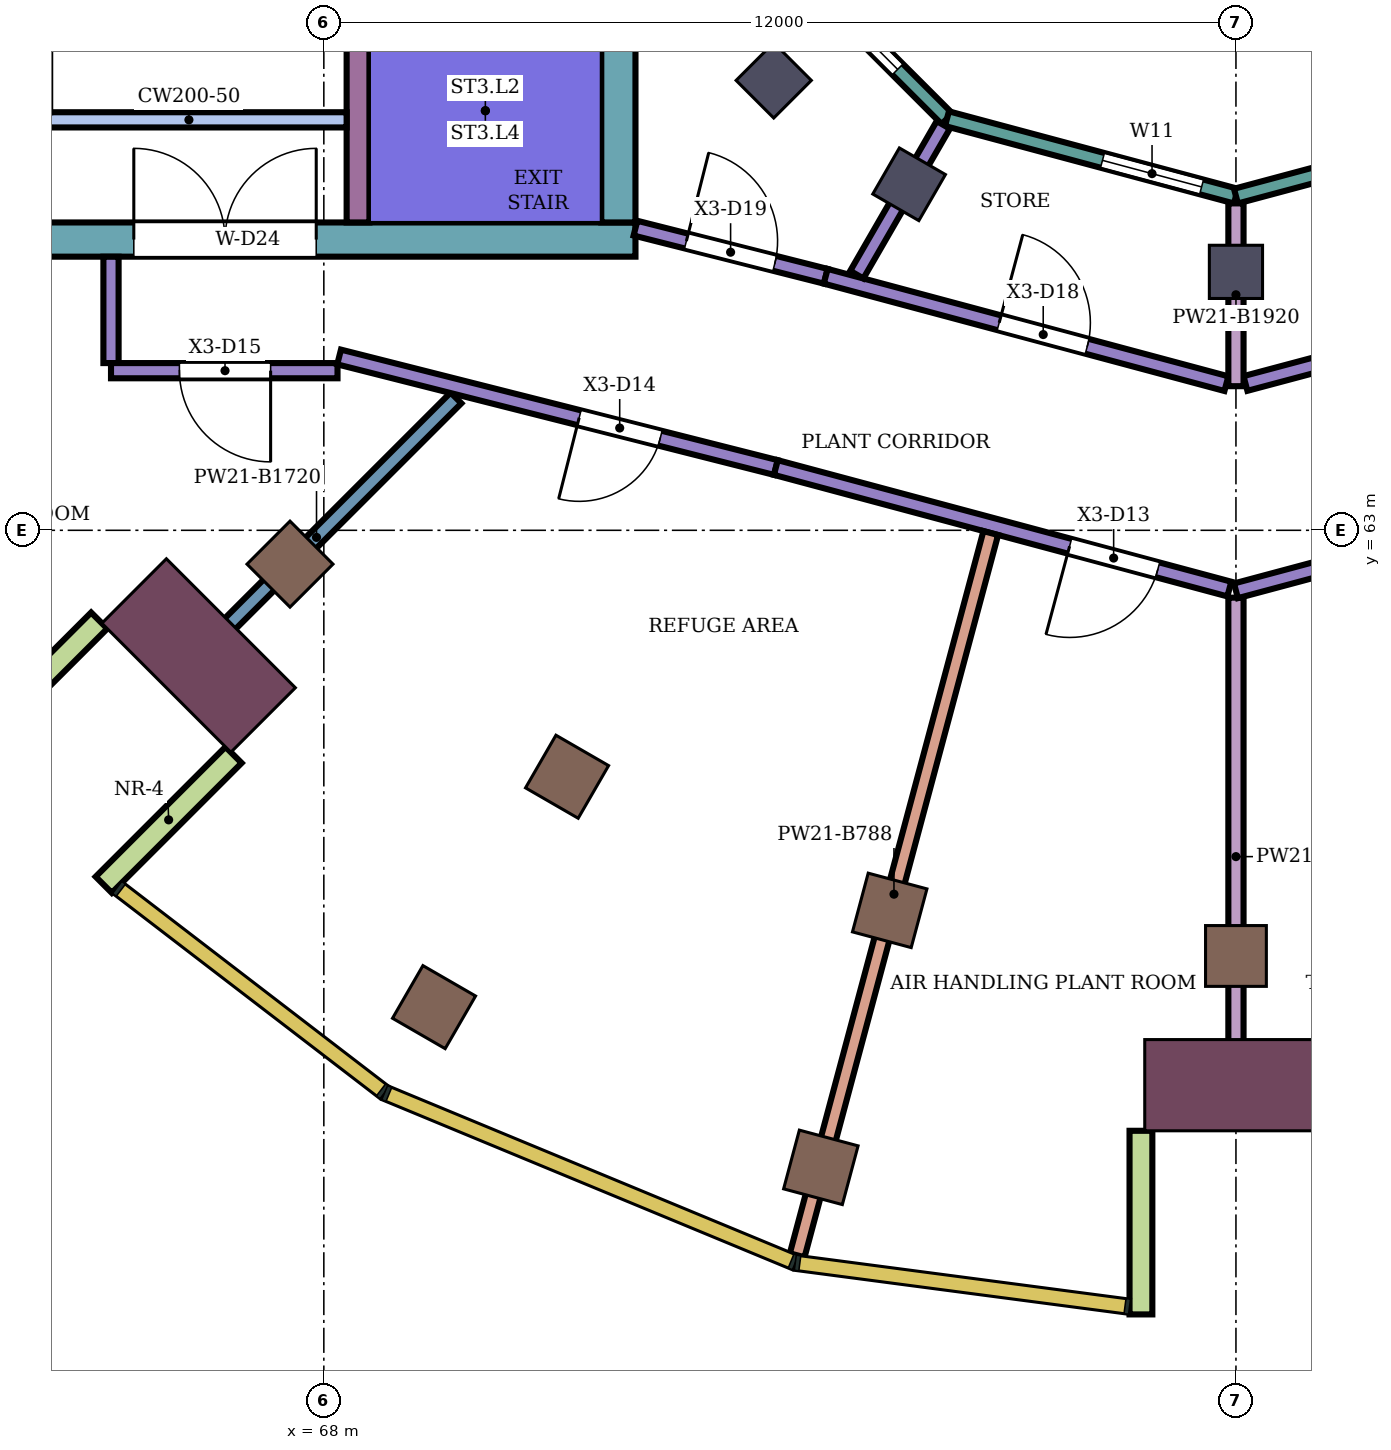
"""IFC4 building model, lengths in metres.
Left out: names, types, materials, properties, quantities, classifications, styles, units other than length and angle.
Written with IfcOpenShell. Run it as: python <this file> out.ifc"""

import sys

from ifc_helpers import new_model, si_unit, direction, frame, frame_2d, origin, origin_2d, place, context, subcontext, project, spatial, rectangle, extrude, element, fill, save


model = new_model("IFC4")
c1 = context("Model", 3, precision=1e-05, world=origin(), true_north=direction((0.0, 1.0)))
c2 = subcontext(c1, "Body", "Model", "MODEL_VIEW")
j1 = project(units=[si_unit("LENGTHUNIT", "METRE"), si_unit("PLANEANGLEUNIT", "RADIAN")], contexts=[c1])
p1 = place(None, origin())
s1 = spatial("IfcSite", under=j1, at=p1, CompositionType="ELEMENT")
p2 = place(p1, origin())
s2 = spatial("IfcBuilding", under=s1, at=p2, CompositionType="ELEMENT")
p3 = place(p2, frame((0.0, 0.0, 309.3)))
s3 = spatial("IfcBuildingStorey", under=s2, at=p3, CompositionType="ELEMENT", Elevation=309.3)
for number, where, z_axis, x_axis in (
    (1, (69.45, 56.727, 0.0), (0.0, 0.0, 1.0), (-0.5, -0.866, 0.0)),
    (2, (74.539, 54.619, 0.0), (0.0, 0.0, 1.0), (-0.259, -0.966, 0.0)),
    (3, (67.555, 62.555, 0.0), (0.0, 0.0, 1.0), (-0.707, -0.707, 0.0)),
    (4, (71.2, 59.758, 0.0), (0.0, 0.0, 1.0), (-0.5, -0.866, 0.0)),
    (5, (75.445, 58.0, 0.0), (0.0, 0.0, 1.0), (-0.259, -0.966, 0.0)),
    (6, (80.0, 57.4, 0.0), (0.0, 0.0, 1.0), (0.0, -1.0, 0.0)),
):
    element("IfcColumn", number, at=place(p3, frame(where, z_axis=z_axis, x_axis=x_axis)), inside=s3, PredefinedType="COLUMN", context=c2, shape_type="SweptSolid", body=[
        extrude(rectangle(XDim=0.8, YDim=0.8, at=origin_2d()), origin(), (0.0, 0.0, 1.0), 5.6),
    ])
for number, where, z_axis, x_axis in (
    (7, (73.919, 68.919, 0.0), (0.0, 0.0, 1.0), (-0.707, -0.707, 0.0)),
    (8, (75.7, 67.552, 0.0), (0.0, 0.0, 1.0), (-0.5, -0.866, 0.0)),
    (9, (80.0, 66.4, 0.0), (0.0, 0.0, 1.0), (0.0, -1.0, 0.0)),
):
    element("IfcColumn", number, at=place(p3, frame(where, z_axis=z_axis, x_axis=x_axis)), inside=s3, PredefinedType="COLUMN", context=c2, shape_type="SweptSolid", body=[
        extrude(rectangle(XDim=0.7, YDim=0.7, at=origin_2d()), origin(), (0.0, 0.0, 1.0), 5.6),
    ])
for number, where, z_axis, x_axis in (
    (10, (66.353, 61.353, 0.0), (0.0, 0.0, 1.0), (-0.707, -0.707, 0.0)),
    (11, (80.0, 55.7, 0.0), (0.0, 0.0, 1.0), (0.0, -1.0, 0.0)),
):
    element("IfcColumn", number, at=place(p3, frame(where, z_axis=z_axis, x_axis=x_axis)), inside=s3, PredefinedType="COLUMN", context=c2, shape_type="SweptSolid", body=[
        extrude(rectangle(XDim=1.2, YDim=2.4, at=origin_2d()), origin(), (0.0, 0.0, 1.0), 5.6),
    ])
p4 = place(p3, frame((72.1, 66.825, 0.0), z_axis=(0.0, 0.0, 1.0), x_axis=(-1.0, 0.0, 0.0)))
e12 = element("IfcWall", 12, at=p4, inside=s3, PredefinedType="SHEAR", context=c2, shape_type="SweptSolid", body=[
    extrude(rectangle(XDim=12.0, YDim=0.45, at=frame_2d((6.0, 0.0))), origin(), (0.0, 0.0, 1.0), 5.28),
])
p5 = place(p4, frame((4.2, 0.0, 0.0)))
e13 = element("IfcOpeningElement", 13, at=p5, cuts=e12, PredefinedType="OPENING", context=c2, shape_type="SweptSolid", body=[
    extrude(rectangle(XDim=2.4, YDim=2.4, at=frame_2d((1.2, 1.2))), frame((0.0, 0.235, 0.0), z_axis=(0.0, -1.0, 0.0), x_axis=(1.0, 0.0, 0.0)), (0.0, 0.0, 1.0), 0.47),
])
p6 = place(p3, frame((71.875, 75.0, 0.0), z_axis=(0.0, 0.0, 1.0), x_axis=(0.0, -1.0, 0.0)))
e14 = element("IfcWall", 14, at=p6, inside=s3, PredefinedType="SHEAR", context=c2, shape_type="SweptSolid", body=[
    extrude(rectangle(XDim=7.95, YDim=0.45, at=frame_2d((3.975, 0.0))), origin(), (0.0, 0.0, 1.0), 5.28),
])
p7 = place(p3, frame((68.45, 75.0, 0.0), z_axis=(0.0, 0.0, 1.0), x_axis=(0.0, -1.0, 0.0)))
e15 = element("IfcWall", 15, at=p7, inside=s3, PredefinedType="SHEAR", context=c2, shape_type="SweptSolid", body=[
    extrude(rectangle(XDim=7.95, YDim=0.3, at=frame_2d((3.975, 0.0))), origin(), (0.0, 0.0, 1.0), 5.28),
])
p8 = place(p7, frame((1.85, 0.0, 0.0)))
e16 = element("IfcOpeningElement", 16, at=p8, cuts=e15, PredefinedType="OPENING", context=c2, shape_type="SweptSolid", body=[
    extrude(rectangle(XDim=0.9, YDim=2.1, at=frame_2d((0.45, 1.05))), frame((0.0, 0.16, 0.0), z_axis=(0.0, -1.0, 0.0), x_axis=(1.0, 0.0, 0.0)), (0.0, 0.0, 1.0), 0.32),
])
p9 = place(p3, frame((68.3, 68.4, 0.0), z_axis=(0.0, 0.0, 1.0), x_axis=(-1.0, 0.0, 0.0)))
e17 = element("IfcWall", 17, at=p9, inside=s3, PredefinedType="SHEAR", context=c2, shape_type="SweptSolid", body=[
    extrude(rectangle(XDim=4.15, YDim=0.2, at=frame_2d((2.075, 0.0))), origin(), (0.0, 0.0, 1.0), 5.28),
])
for number, where, z_axis, x_axis in (
    (18, (65.045, 61.812, 0.0), (0.0, 0.0, 1.0), (-0.707, -0.707, 0.0)),
    (19, (66.812, 60.045, 0.0), (0.0, 0.0, 1.0), (-0.707, -0.707, 0.0)),
    (20, (78.75, 55.1, 0.0), (0.0, 0.0, 1.0), (0.0, -1.0, 0.0)),
):
    element("IfcWall", number, at=place(p3, frame(where, z_axis=z_axis, x_axis=x_axis)), inside=s3, PredefinedType="NOTDEFINED", context=c2, shape_type="SweptSolid", body=[
        extrude(rectangle(XDim=2.416, YDim=0.3, at=frame_2d((1.208, 0.0))), origin(), (0.0, 0.0, 1.0), 5.6),
    ])
p10 = place(p3, frame((73.415, 71.198, 0.0), z_axis=(0.0, 0.0, 1.0), x_axis=(0.707106781187, -0.707106781187, 0.0)))
e21 = element("IfcWall", 21, at=p10, inside=s3, PredefinedType="NOTDEFINED", context=c2, shape_type="SweptSolid", body=[
    extrude(rectangle(XDim=3.936, YDim=0.2, at=frame_2d((1.968, 0.0))), origin(), (0.0, 0.0, 1.0), 5.6),
])
p11 = place(p10, frame((0.468, 0.0, 0.9)))
e22 = element("IfcOpeningElement", 22, at=p11, cuts=e21, PredefinedType="OPENING", context=c2, shape_type="SweptSolid", body=[
    extrude(rectangle(XDim=2.55, YDim=2.3, at=frame_2d((1.275, 1.15))), frame((0.0, 0.11, 0.0), z_axis=(0.0, -1.0, 0.0), x_axis=(1.0, 0.0, 0.0)), (0.0, 0.0, 1.0), 0.22),
])
p12 = place(p3, frame((76.198, 68.415, 0.0), z_axis=(0.0, 0.0, 1.0), x_axis=(0.965933654434, -0.258789828301, 0.0)))
e23 = element("IfcWall", 23, at=p12, inside=s3, PredefinedType="NOTDEFINED", context=c2, shape_type="SweptSolid", body=[
    extrude(rectangle(XDim=3.936, YDim=0.2, at=frame_2d((1.968, 0.0))), origin(), (0.0, 0.0, 1.0), 5.6),
])
p13 = place(p12, frame((2.118, 0.0, 0.9)))
e24 = element("IfcOpeningElement", 24, at=p13, cuts=e23, PredefinedType="OPENING", context=c2, shape_type="SweptSolid", body=[
    extrude(rectangle(XDim=1.35, YDim=2.3, at=frame_2d((0.675, 1.15))), frame((0.0, 0.11, 0.0), z_axis=(0.0, -1.0, 0.0), x_axis=(1.0, 0.0, 0.0)), (0.0, 0.0, 1.0), 0.22),
])
p14 = place(p3, frame((80.0, 67.396, 0.0), z_axis=(0.0, 0.0, 1.0), x_axis=(0.965933654434, 0.258789828301, 0.0)))
e25 = element("IfcWall", 25, at=p14, inside=s3, PredefinedType="NOTDEFINED", context=c2, shape_type="SweptSolid", body=[
    extrude(rectangle(XDim=3.936, YDim=0.2, at=frame_2d((1.968, 0.0))), origin(), (0.0, 0.0, 1.0), 5.6),
])
p15 = place(p14, frame((2.118, 0.0, 0.9)))
e26 = element("IfcOpeningElement", 26, at=p15, cuts=e25, PredefinedType="OPENING", context=c2, shape_type="SweptSolid", body=[
    extrude(rectangle(XDim=1.35, YDim=2.3, at=frame_2d((0.675, 1.15))), frame((0.0, 0.11, 0.0), z_axis=(0.0, -1.0, 0.0), x_axis=(1.0, 0.0, 0.0)), (0.0, 0.0, 1.0), 0.22),
])
p16 = place(p3, frame((65.2, 65.2, 0.0), z_axis=(0.0, 0.0, 1.0), x_axis=(0.0, 1.0, 0.0)))
e27 = element("IfcWall", 27, at=p16, inside=s3, PredefinedType="PARTITIONING", context=c2, shape_type="SweptSolid", body=[
    extrude(rectangle(XDim=1.399, YDim=0.2, at=frame_2d((0.7, 0.0))), origin(), (0.0, 0.0, 1.0), 5.15),
])
p17 = place(p3, frame((65.2, 65.1, 0.0), z_axis=(0.0, 0.0, 1.0), x_axis=(1.0, 0.0, 0.0)))
e28 = element("IfcWall", 28, at=p17, inside=s3, PredefinedType="PARTITIONING", context=c2, shape_type="SweptSolid", body=[
    extrude(rectangle(XDim=2.98, YDim=0.2, at=frame_2d((1.49, 0.0))), origin(), (0.0, 0.0, 1.0), 5.15),
])
p18 = place(p17, frame((0.9, 0.0, 0.0)))
e29 = element("IfcOpeningElement", 29, at=p18, cuts=e28, PredefinedType="OPENING", context=c2, shape_type="SweptSolid", body=[
    extrude(rectangle(XDim=1.2, YDim=2.4, at=frame_2d((0.6, 1.2))), frame((0.0, 0.11, 0.0), z_axis=(0.0, -1.0, 0.0), x_axis=(1.0, 0.0, 0.0)), (0.0, 0.0, 1.0), 0.22),
])
p19 = place(p3, frame((66.069, 61.073, 0.0), z_axis=(0.0, 0.0, 1.0), x_axis=(0.707200867644, 0.707012682208, 0.0)))
e30 = element("IfcWall", 30, at=p19, inside=s3, PredefinedType="PARTITIONING", context=c2, shape_type="SweptSolid", body=[
    extrude(rectangle(XDim=5.189, YDim=0.2, at=frame_2d((2.595, 0.0))), origin(), (0.0, 0.0, 1.0), 3.88),
])
p20 = place(p3, frame((68.201, 65.28, 0.0), z_axis=(0.0, 0.0, 1.0), x_axis=(0.969440682923, -0.245325828836, 0.0)))
e31 = element("IfcWall", 31, at=p20, inside=s3, PredefinedType="PARTITIONING", context=c2, shape_type="SweptSolid", body=[
    extrude(rectangle(XDim=5.927, YDim=0.2, at=frame_2d((2.964, 0.0))), origin(), (0.0, 0.0, 1.0), 5.15),
])
p21 = place(p20, frame((3.258, 0.0, 0.0)))
e32 = element("IfcOpeningElement", 32, at=p21, cuts=e31, PredefinedType="OPENING", context=c2, shape_type="SweptSolid", body=[
    extrude(rectangle(XDim=1.1, YDim=2.1, at=frame_2d((0.55, 1.05))), frame((0.0, 0.11, 0.0), z_axis=(0.0, -1.0, 0.0), x_axis=(1.0, 0.0, 0.0)), (0.0, 0.0, 1.0), 0.22),
])
p22 = place(p3, frame((72.1, 66.975, 0.0), z_axis=(0.0, 0.0, 1.0), x_axis=(0.969471314457, -0.245204752086, 0.0)))
e33 = element("IfcWall", 33, at=p22, inside=s3, PredefinedType="PARTITIONING", context=c2, shape_type="SweptSolid", body=[
    extrude(rectangle(XDim=2.582, YDim=0.2, at=frame_2d((1.291, 0.0))), origin(), (0.0, 0.0, 1.0), 5.15),
])
p23 = place(p22, frame((0.691, 0.0, 0.0)))
e34 = element("IfcOpeningElement", 34, at=p23, cuts=e33, PredefinedType="OPENING", context=c2, shape_type="SweptSolid", body=[
    extrude(rectangle(XDim=1.2, YDim=2.4, at=frame_2d((0.6, 1.2))), frame((0.0, 0.11, 0.0), z_axis=(0.0, -1.0, 0.0), x_axis=(1.0, 0.0, 0.0)), (0.0, 0.0, 1.0), 0.22),
])
p24 = place(p3, frame((73.947, 63.826, 0.0), z_axis=(0.0, 0.0, 1.0), x_axis=(0.965924585279, -0.258823676573, 0.0)))
e35 = element("IfcWall", 35, at=p24, inside=s3, PredefinedType="PARTITIONING", context=c2, shape_type="SweptSolid", body=[
    extrude(rectangle(XDim=6.177, YDim=0.2, at=frame_2d((3.088, 0.0))), origin(), (0.0, 0.0, 1.0), 5.15),
])
p25 = place(p24, frame((4.001, 0.0, 0.0)))
e36 = element("IfcOpeningElement", 36, at=p25, cuts=e35, PredefinedType="OPENING", context=c2, shape_type="SweptSolid", body=[
    extrude(rectangle(XDim=1.2, YDim=2.4, at=frame_2d((0.6, 1.2))), frame((0.0, 0.11, 0.0), z_axis=(0.0, -1.0, 0.0), x_axis=(1.0, 0.0, 0.0)), (0.0, 0.0, 1.0), 0.22),
])
p26 = place(p3, frame((74.228, 53.462, 0.0), z_axis=(0.0, 0.0, 1.0), x_axis=(0.258887433163, 0.965907499169, 0.0)))
e37 = element("IfcWall", 37, at=p26, inside=s3, PredefinedType="PARTITIONING", context=c2, shape_type="SweptSolid", body=[
    extrude(rectangle(XDim=9.837, YDim=0.2, at=frame_2d((4.918, 0.0))), origin(), (0.0, 0.0, 1.0), 4.812),
])
p27 = place(p3, frame((74.603, 66.342, 0.0), z_axis=(0.0, 0.0, 1.0), x_axis=(0.965920893652, -0.258837453254, 0.0)))
e38 = element("IfcWall", 38, at=p27, inside=s3, PredefinedType="PARTITIONING", context=c2, shape_type="SweptSolid", body=[
    extrude(rectangle(XDim=5.458, YDim=0.2, at=frame_2d((2.729, 0.0))), origin(), (0.0, 0.0, 1.0), 5.15),
])
p28 = place(p27, frame((2.362, 0.0, 0.0)))
e39 = element("IfcOpeningElement", 39, at=p28, cuts=e38, PredefinedType="OPENING", context=c2, shape_type="SweptSolid", body=[
    extrude(rectangle(XDim=1.2, YDim=2.4, at=frame_2d((0.6, 1.2))), frame((0.0, 0.11, 0.0), z_axis=(0.0, -1.0, 0.0), x_axis=(1.0, 0.0, 0.0)), (0.0, 0.0, 1.0), 0.22),
])
p29 = place(p3, frame((75.012, 66.363, 0.0), z_axis=(0.0, 0.0, 1.0), x_axis=(0.500143511652, 0.865942531438, 0.0)))
e40 = element("IfcWall", 40, at=p29, inside=s3, PredefinedType="PARTITIONING", context=c2, shape_type="SweptSolid", body=[
    extrude(rectangle(XDim=2.275, YDim=0.2, at=frame_2d((1.138, 0.0))), origin(), (0.0, 0.0, 1.0), 5.15),
])
p30 = place(p3, frame((80.125, 64.932, 0.0), z_axis=(0.0, 0.0, 1.0), x_axis=(0.966236955806, 0.257655089674, 0.0)))
e41 = element("IfcWall", 41, at=p30, inside=s3, PredefinedType="PARTITIONING", context=c2, shape_type="SweptSolid", body=[
    extrude(rectangle(XDim=8.039, YDim=0.2, at=frame_2d((4.02, 0.0))), origin(), (0.0, 0.0, 1.0), 5.15),
])
p31 = place(p30, frame((6.148, 0.0, 0.0)))
e42 = element("IfcOpeningElement", 42, at=p31, cuts=e41, PredefinedType="OPENING", context=c2, shape_type="SweptSolid", body=[
    extrude(rectangle(XDim=1.2, YDim=2.4, at=frame_2d((0.6, 1.2))), frame((0.0, 0.11, 0.0), z_axis=(0.0, -1.0, 0.0), x_axis=(1.0, 0.0, 0.0)), (0.0, 0.0, 1.0), 0.22),
])
p32 = place(p30, frame((1.895, 0.0, 0.0)))
e43 = element("IfcOpeningElement", 43, at=p32, cuts=e41, PredefinedType="OPENING", context=c2, shape_type="SweptSolid", body=[
    extrude(rectangle(XDim=1.2, YDim=2.4, at=frame_2d((0.6, 1.2))), frame((0.0, 0.11, 0.0), z_axis=(0.0, -1.0, 0.0), x_axis=(1.0, 0.0, 0.0)), (0.0, 0.0, 1.0), 0.22),
])
p33 = place(p3, frame((80.0, 55.3, 0.0), z_axis=(0.0, 0.0, 1.0), x_axis=(0.0, 1.0, 0.0)))
e44 = element("IfcWall", 44, at=p33, inside=s3, PredefinedType="PARTITIONING", context=c2, shape_type="SweptSolid", body=[
    extrude(rectangle(XDim=6.814, YDim=0.2, at=frame_2d((3.407, 0.0))), origin(), (0.0, 0.0, 1.0), 3.68),
])
p34 = place(p3, frame((80.0, 62.204, 0.0), z_axis=(0.0, 0.0, 1.0), x_axis=(0.965938139786, 0.258773086132, 0.0)))
e45 = element("IfcWall", 45, at=p34, inside=s3, PredefinedType="PARTITIONING", context=c2, shape_type="SweptSolid", body=[
    extrude(rectangle(XDim=6.266, YDim=0.2, at=frame_2d((3.133, 0.0))), origin(), (0.0, 0.0, 1.0), 5.15),
])
p35 = place(p34, frame((1.066, 0.0, 0.0)))
e46 = element("IfcOpeningElement", 46, at=p35, cuts=e45, PredefinedType="OPENING", context=c2, shape_type="SweptSolid", body=[
    extrude(rectangle(XDim=1.2, YDim=2.4, at=frame_2d((0.6, 1.2))), frame((0.0, 0.11, 0.0), z_axis=(0.0, -1.0, 0.0), x_axis=(1.0, 0.0, 0.0)), (0.0, 0.0, 1.0), 0.22),
])
p36 = place(p3, frame((80.0, 64.896, 0.0), z_axis=(0.0, 0.0, 1.0), x_axis=(0.0, 1.0, 0.0)))
e47 = element("IfcWall", 47, at=p36, inside=s3, PredefinedType="PARTITIONING", context=c2, shape_type="SweptSolid", body=[
    extrude(rectangle(XDim=2.405, YDim=0.2, at=frame_2d((1.203, 0.0))), origin(), (0.0, 0.0, 1.0), 3.68),
])
p37 = place(p11, origin())
e48 = element("IfcWindow", 48, at=p37, inside=s3, PartitioningType="SINGLE_PANEL", PredefinedType="WINDOW", context=c2, shape_type="SweptSolid", body=[
    extrude(rectangle(XDim=2.55, YDim=2.3, at=frame_2d((1.275, 1.15))), frame((0.0, 0.03, 0.0), z_axis=(0.0, -1.0, 0.0), x_axis=(1.0, 0.0, 0.0)), (0.0, 0.0, 1.0), 0.06),
])
fill(e22, e48)
p38 = place(p13, origin())
e49 = element("IfcWindow", 49, at=p38, inside=s3, PartitioningType="SINGLE_PANEL", PredefinedType="WINDOW", context=c2, shape_type="SweptSolid", body=[
    extrude(rectangle(XDim=1.35, YDim=2.3, at=frame_2d((0.675, 1.15))), frame((0.0, 0.03, 0.0), z_axis=(0.0, -1.0, 0.0), x_axis=(1.0, 0.0, 0.0)), (0.0, 0.0, 1.0), 0.06),
])
fill(e24, e49)
p39 = place(p25, frame((1.2, 0.0, 0.0), z_axis=(0.0, 0.0, 1.0), x_axis=(-1.0, 0.0, 0.0)))
e50 = element("IfcDoor", 50, at=p39, inside=s3, OperationType="SINGLE_SWING_RIGHT", PredefinedType="DOOR", context=c2, shape_type="SweptSolid", body=[
    extrude(rectangle(XDim=1.2, YDim=2.4, at=frame_2d((0.6, 1.2))), frame((0.0, 0.025, 0.0), z_axis=(0.0, -1.0, 0.0), x_axis=(1.0, 0.0, 0.0)), (0.0, 0.0, 1.0), 0.05),
])
fill(e36, e50)
p40 = place(p21, frame((1.1, 0.0, 0.0), z_axis=(0.0, 0.0, 1.0), x_axis=(-1.0, 0.0, 0.0)))
e51 = element("IfcDoor", 51, at=p40, inside=s3, OperationType="SINGLE_SWING_RIGHT", PredefinedType="DOOR", context=c2, shape_type="SweptSolid", body=[
    extrude(rectangle(XDim=1.1, YDim=2.1, at=frame_2d((0.55, 1.05))), frame((0.0, 0.025, 0.0), z_axis=(0.0, -1.0, 0.0), x_axis=(1.0, 0.0, 0.0)), (0.0, 0.0, 1.0), 0.05),
])
fill(e32, e51)
p41 = place(p18, frame((1.2, 0.0, 0.0), z_axis=(0.0, 0.0, 1.0), x_axis=(-1.0, 0.0, 0.0)))
e52 = element("IfcDoor", 52, at=p41, inside=s3, OperationType="SINGLE_SWING_LEFT", PredefinedType="DOOR", context=c2, shape_type="SweptSolid", body=[
    extrude(rectangle(XDim=1.2, YDim=2.4, at=frame_2d((0.6, 1.2))), frame((0.0, 0.025, 0.0), z_axis=(0.0, -1.0, 0.0), x_axis=(1.0, 0.0, 0.0)), (0.0, 0.0, 1.0), 0.05),
])
fill(e29, e52)
p42 = place(p28, origin())
e53 = element("IfcDoor", 53, at=p42, inside=s3, OperationType="SINGLE_SWING_LEFT", PredefinedType="DOOR", context=c2, shape_type="SweptSolid", body=[
    extrude(rectangle(XDim=1.2, YDim=2.4, at=frame_2d((0.6, 1.2))), frame((0.0, 0.025, 0.0), z_axis=(0.0, -1.0, 0.0), x_axis=(1.0, 0.0, 0.0)), (0.0, 0.0, 1.0), 0.05),
])
fill(e39, e53)
p43 = place(p23, origin())
e54 = element("IfcDoor", 54, at=p43, inside=s3, OperationType="SINGLE_SWING_LEFT", PredefinedType="DOOR", context=c2, shape_type="SweptSolid", body=[
    extrude(rectangle(XDim=1.2, YDim=2.4, at=frame_2d((0.6, 1.2))), frame((0.0, 0.025, 0.0), z_axis=(0.0, -1.0, 0.0), x_axis=(1.0, 0.0, 0.0)), (0.0, 0.0, 1.0), 0.05),
])
fill(e34, e54)
p44 = place(p5, frame((2.4, 0.0, 0.0), z_axis=(0.0, 0.0, 1.0), x_axis=(-1.0, 0.0, 0.0)))
e55 = element("IfcDoor", 55, at=p44, inside=s3, OperationType="DOUBLE_DOOR_SINGLE_SWING", PredefinedType="DOOR", context=c2, shape_type="SweptSolid", body=[
    extrude(rectangle(XDim=2.4, YDim=2.4, at=frame_2d((1.2, 1.2))), frame((0.0, 0.025, 0.0), z_axis=(0.0, -1.0, 0.0), x_axis=(1.0, 0.0, 0.0)), (0.0, 0.0, 1.0), 0.05),
])
fill(e13, e55)
save(model, sys.argv[1])
